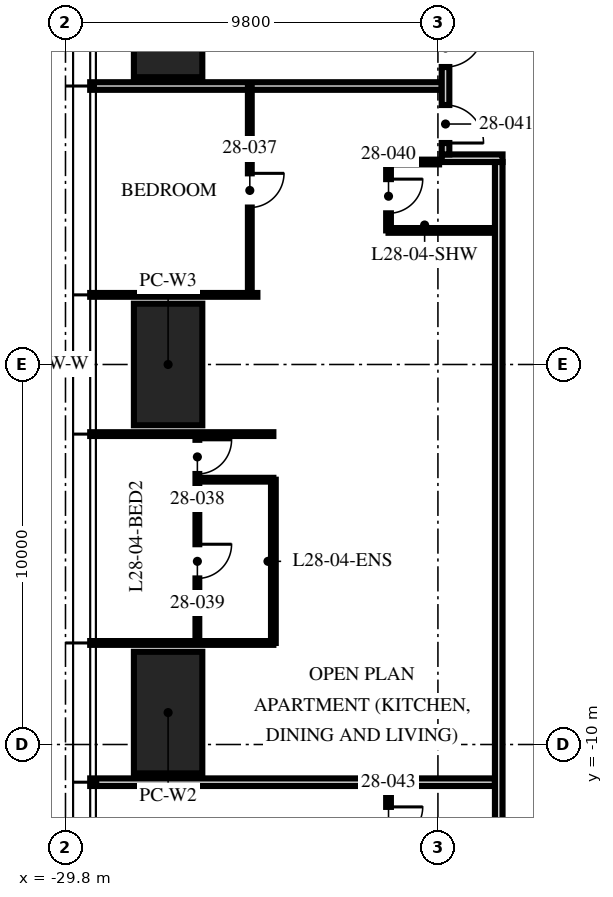
"""IFC4 building model, lengths in metres.
Left out: names, types, materials, properties, quantities, classifications, styles, units other than length and angle.
Written with IfcOpenShell. Run it as: python <this file> out.ifc"""

import sys

from ifc_helpers import new_model, si_unit, direction, frame, frame_2d, origin, origin_2d, place, context, subcontext, project, spatial, rectangle, hollow_rectangle, extrude, element, fill, save


model = new_model("IFC4")
c1 = context("Model", 3, precision=1e-05, world=origin(), true_north=direction((0.0, 1.0)))
c2 = subcontext(c1, "Body", "Model", "MODEL_VIEW")
j1 = project(units=[si_unit("LENGTHUNIT", "METRE"), si_unit("PLANEANGLEUNIT", "RADIAN")], contexts=[c1])
p1 = place(None, origin())
s1 = spatial("IfcSite", under=j1, at=p1, CompositionType="ELEMENT")
p2 = place(p1, origin())
s2 = spatial("IfcBuilding", under=s1, at=p2, CompositionType="ELEMENT")
p3 = place(p2, frame((0.0, 0.0, 114.75)))
s3 = spatial("IfcBuildingStorey", under=s2, at=p3, CompositionType="ELEMENT", Elevation=114.75)
for number, where, z_axis, x_axis in (
    (1, (-27.1, -9.16, 0.0), (0.0, 0.0, 1.0), (0.0, 1.0, 0.0)),
    (2, (-27.1, 0.0, 0.0), (0.0, 0.0, 1.0), (0.0, 1.0, 0.0)),
    (3, (-27.1, 9.16, 0.0), (0.0, 0.0, 1.0), (0.0, 1.0, 0.0)),
):
    element("IfcColumn", number, at=place(p3, frame(where, z_axis=z_axis, x_axis=x_axis)), inside=s3, PredefinedType="COLUMN", context=c2, shape_type="SweptSolid", body=[
        extrude(hollow_rectangle(XDim=3.2, YDim=1.8, WallThickness=0.2, at=origin_2d()), origin(), (0.0, 0.0, 1.0), 3.75),
    ])
p4 = place(p3, frame((-19.9, 7.328, 0.0), z_axis=(0.0, 0.0, 1.0), x_axis=(-1.0, 0.0, 0.0)))
e4 = element("IfcWall", 4, at=p4, inside=s3, PredefinedType="PARTITIONING", context=c2, shape_type="SweptSolid", body=[
    extrude(rectangle(XDim=9.25, YDim=0.2, at=frame_2d((4.625, 0.0))), origin(), (0.0, 0.0, 1.0), 2.81),
])
p5 = place(p3, frame((-24.75, 1.832, 0.0), z_axis=(0.0, 0.0, 1.0), x_axis=(-1.0, 0.0, 0.0)))
e5 = element("IfcWall", 5, at=p5, inside=s3, PredefinedType="PARTITIONING", context=c2, shape_type="SweptSolid", body=[
    extrude(rectangle(XDim=4.4, YDim=0.1, at=frame_2d((2.2, 0.0))), origin(), (0.0, 0.0, 1.0), 2.81),
])
for number, where, z_axis, x_axis in (
    (6, (-24.33, -1.832, 0.0), (0.0, 0.0, 1.0), (-1.0, 0.0, 0.0)),
    (7, (-24.33, -7.328, 0.0), (0.0, 0.0, 1.0), (-1.0, 0.0, 0.0)),
):
    element("IfcWall", number, at=place(p3, frame(where, z_axis=z_axis, x_axis=x_axis)), inside=s3, PredefinedType="PARTITIONING", context=c2, shape_type="SweptSolid", body=[
        extrude(rectangle(XDim=4.82, YDim=0.1, at=frame_2d((2.41, 0.0))), origin(), (0.0, 0.0, 1.0), 2.81),
    ])
p6 = place(p3, frame((-18.5, -10.992, 0.0), z_axis=(0.0, 0.0, 1.0), x_axis=(-1.0, 0.0, 0.0)))
e8 = element("IfcWall", 8, at=p6, inside=s3, PredefinedType="PARTITIONING", context=c2, shape_type="SweptSolid", body=[
    extrude(rectangle(XDim=10.65, YDim=0.2, at=frame_2d((5.325, 0.0))), origin(), (0.0, 0.0, 1.0), 2.81),
])
p7 = place(p3, frame((-24.95, 7.328, 0.0), z_axis=(0.0, 0.0, 1.0), x_axis=(0.0, -1.0, 0.0)))
e9 = element("IfcWall", 9, at=p7, inside=s3, PredefinedType="PARTITIONING", context=c2, shape_type="SweptSolid", body=[
    extrude(rectangle(XDim=5.496, YDim=0.1, at=frame_2d((2.748, 0.0))), origin(), (0.0, 0.0, 1.0), 2.81),
])
p8 = place(p7, frame((2.298, 0.0, 0.0)))
e10 = element("IfcOpeningElement", 10, at=p8, cuts=e9, PredefinedType="OPENING", context=c2, shape_type="SweptSolid", body=[
    extrude(rectangle(XDim=0.9, YDim=2.1, at=frame_2d((0.45, 1.05))), frame((0.0, 0.06, 0.0), z_axis=(0.0, -1.0, 0.0), x_axis=(1.0, 0.0, 0.0)), (0.0, 0.0, 1.0), 0.12),
])
p9 = place(p3, frame((-26.33, -1.832, 0.0), z_axis=(0.0, 0.0, 1.0), x_axis=(0.0, -1.0, 0.0)))
e11 = element("IfcWall", 11, at=p9, inside=s3, PredefinedType="PARTITIONING", context=c2, shape_type="SweptSolid", body=[
    extrude(rectangle(XDim=5.496, YDim=0.1, at=frame_2d((2.748, 0.0))), origin(), (0.0, 0.0, 1.0), 2.81),
])
p10 = place(p9, frame((0.15, 0.0, 0.0)))
e12 = element("IfcOpeningElement", 12, at=p10, cuts=e11, PredefinedType="OPENING", context=c2, shape_type="SweptSolid", body=[
    extrude(rectangle(XDim=0.9, YDim=2.1, at=frame_2d((0.45, 1.05))), frame((0.0, 0.06, 0.0), z_axis=(0.0, -1.0, 0.0), x_axis=(1.0, 0.0, 0.0)), (0.0, 0.0, 1.0), 0.12),
])
p11 = place(p9, frame((2.898, 0.0, 0.0)))
e13 = element("IfcOpeningElement", 13, at=p11, cuts=e11, PredefinedType="OPENING", context=c2, shape_type="SweptSolid", body=[
    extrude(rectangle(XDim=0.9, YDim=2.1, at=frame_2d((0.45, 1.05))), frame((0.0, 0.06, 0.0), z_axis=(0.0, -1.0, 0.0), x_axis=(1.0, 0.0, 0.0)), (0.0, 0.0, 1.0), 0.12),
])
p12 = place(p3, frame((-24.33, -3.032, 0.0), z_axis=(0.0, 0.0, 1.0), x_axis=(-1.0, 0.0, 0.0)))
e14 = element("IfcWall", 14, at=p12, inside=s3, PredefinedType="PARTITIONING", context=c2, shape_type="SweptSolid", body=[
    extrude(rectangle(XDim=2.0, YDim=0.1, at=frame_2d((1.0, 0.0))), origin(), (0.0, 0.0, 1.0), 3.5),
])
p13 = place(p3, frame((-24.33, -3.032, 0.0), z_axis=(0.0, 0.0, 1.0), x_axis=(0.0, -1.0, 0.0)))
e15 = element("IfcWall", 15, at=p13, inside=s3, PredefinedType="PARTITIONING", context=c2, shape_type="SweptSolid", body=[
    extrude(rectangle(XDim=4.296, YDim=0.125, at=frame_2d((2.148, 0.0))), origin(), (0.0, 0.0, 1.0), 2.81),
])
p14 = place(p3, frame((-21.3, 5.328, 0.0), z_axis=(0.0, 0.0, 1.0), x_axis=(0.0, -1.0, 0.0)))
e16 = element("IfcWall", 16, at=p14, inside=s3, PredefinedType="PARTITIONING", context=c2, shape_type="SweptSolid", body=[
    extrude(rectangle(XDim=1.8, YDim=0.125, at=frame_2d((0.9, 0.0))), origin(), (0.0, 0.0, 1.0), 2.81),
])
p15 = place(p14, frame((0.45, 0.0, 0.0)))
e17 = element("IfcOpeningElement", 17, at=p15, cuts=e16, PredefinedType="OPENING", context=c2, shape_type="SweptSolid", body=[
    extrude(rectangle(XDim=0.9, YDim=2.1, at=frame_2d((0.45, 1.05))), frame((0.0, 0.073, 0.0), z_axis=(0.0, -1.0, 0.0), x_axis=(1.0, 0.0, 0.0)), (0.0, 0.0, 1.0), 0.145),
])
p16 = place(p3, frame((-19.97, 5.328, 0.0), z_axis=(0.0, 0.0, 1.0), x_axis=(-1.0, 0.0, 0.0)))
e18 = element("IfcWall", 18, at=p16, inside=s3, PredefinedType="PARTITIONING", context=c2, shape_type="SweptSolid", body=[
    extrude(rectangle(XDim=1.33, YDim=0.125, at=frame_2d((0.665, 0.0))), origin(), (0.0, 0.0, 1.0), 3.5),
])
p17 = place(p3, frame((-18.5, 3.528, 0.0), z_axis=(0.0, 0.0, 1.0), x_axis=(-1.0, 0.0, 0.0)))
e19 = element("IfcWall", 19, at=p17, inside=s3, PredefinedType="PARTITIONING", context=c2, shape_type="SweptSolid", body=[
    extrude(rectangle(XDim=2.8, YDim=0.125, at=frame_2d((1.4, 0.0))), origin(), (0.0, 0.0, 1.0), 3.5),
])
p18 = place(p3, frame((-21.3, -10.992, 0.0), z_axis=(0.0, 0.0, 1.0), x_axis=(0.0, -1.0, 0.0)))
e20 = element("IfcWall", 20, at=p18, inside=s3, PredefinedType="PARTITIONING", context=c2, shape_type="SweptSolid", body=[
    extrude(rectangle(XDim=2.2, YDim=0.125, at=frame_2d((1.1, 0.0))), origin(), (0.0, 0.0, 1.0), 3.5),
])
p19 = place(p18, frame((0.65, 0.0, 0.0)))
e21 = element("IfcOpeningElement", 21, at=p19, cuts=e20, PredefinedType="OPENING", context=c2, shape_type="SweptSolid", body=[
    extrude(rectangle(XDim=0.9, YDim=2.1, at=frame_2d((0.45, 1.05))), frame((0.0, 0.073, 0.0), z_axis=(0.0, -1.0, 0.0), x_axis=(1.0, 0.0, 0.0)), (0.0, 0.0, 1.0), 0.145),
])
p20 = place(p3, frame((-18.3, 5.428, 0.0), z_axis=(0.0, 0.0, 1.0), x_axis=(-1.0, 0.0, 0.0)))
e22 = element("IfcWall", 22, at=p20, inside=s3, PredefinedType="PARTITIONING", context=c2, shape_type="SweptSolid", body=[
    extrude(rectangle(XDim=1.6, YDim=0.2, at=frame_2d((0.8, 0.0))), origin(), (0.0, 0.0, 1.0), 3.5),
])
p21 = place(p3, frame((-19.8, 9.128, 0.0), z_axis=(0.0, 0.0, 1.0), x_axis=(0.0, -1.0, 0.0)))
e23 = element("IfcWall", 23, at=p21, inside=s3, PredefinedType="PARTITIONING", context=c2, shape_type="SweptSolid", body=[
    extrude(rectangle(XDim=3.6, YDim=0.2, at=frame_2d((1.8, 0.0))), origin(), (0.0, 0.0, 1.0), 2.7),
])
p22 = place(p21, frame((0.3, 0.0, 0.0)))
e24 = element("IfcOpeningElement", 24, at=p22, cuts=e23, PredefinedType="OPENING", context=c2, shape_type="SweptSolid", body=[
    extrude(rectangle(XDim=1.0, YDim=2.2, at=frame_2d((0.5, 1.1))), frame((0.0, 0.11, 0.0), z_axis=(0.0, -1.0, 0.0), x_axis=(1.0, 0.0, 0.0)), (0.0, 0.0, 1.0), 0.22),
])
p23 = place(p21, frame((2.3, 0.0, 0.0)))
e25 = element("IfcOpeningElement", 25, at=p23, cuts=e23, PredefinedType="OPENING", context=c2, shape_type="SweptSolid", body=[
    extrude(rectangle(XDim=1.0, YDim=2.2, at=frame_2d((0.5, 1.1))), frame((0.0, 0.11, 0.0), z_axis=(0.0, -1.0, 0.0), x_axis=(1.0, 0.0, 0.0)), (0.0, 0.0, 1.0), 0.22),
])
p24 = place(p3, frame((-18.4, 5.328, 0.0), z_axis=(0.0, 0.0, 1.0), x_axis=(0.0, -1.0, 0.0)))
e26 = element("IfcWall", 26, at=p24, inside=s3, PredefinedType="PARTITIONING", context=c2, shape_type="SweptSolid", body=[
    extrude(rectangle(XDim=23.628, YDim=0.2, at=frame_2d((11.814, 0.0))), origin(), (0.0, 0.0, 1.0), 2.3),
])
p25 = place(p24, frame((21.84, 0.0, 0.0)))
e27 = element("IfcOpeningElement", 27, at=p25, cuts=e26, PredefinedType="OPENING", context=c2, shape_type="SweptSolid", body=[
    extrude(rectangle(XDim=1.0, YDim=2.2, at=frame_2d((0.5, 1.1))), frame((0.0, 0.11, 0.0), z_axis=(0.0, -1.0, 0.0), x_axis=(1.0, 0.0, 0.0)), (0.0, 0.0, 1.0), 0.22),
])
p26 = place(p22, origin())
e28 = element("IfcDoor", 28, at=p26, inside=s3, OperationType="SINGLE_SWING_LEFT", PredefinedType="DOOR", context=c2, shape_type="SweptSolid", body=[
    extrude(rectangle(XDim=1.0, YDim=2.2, at=frame_2d((0.5, 1.1))), frame((0.0, 0.025, 0.0), z_axis=(0.0, -1.0, 0.0), x_axis=(1.0, 0.0, 0.0)), (0.0, 0.0, 1.0), 0.05),
])
fill(e24, e28)
p27 = place(p8, origin())
e29 = element("IfcDoor", 29, at=p27, inside=s3, OperationType="SINGLE_SWING_LEFT", PredefinedType="DOOR", context=c2, shape_type="SweptSolid", body=[
    extrude(rectangle(XDim=0.9, YDim=2.1, at=frame_2d((0.45, 1.05))), frame((0.0, 0.025, 0.0), z_axis=(0.0, -1.0, 0.0), x_axis=(1.0, 0.0, 0.0)), (0.0, 0.0, 1.0), 0.05),
])
fill(e10, e29)
p28 = place(p10, origin())
e30 = element("IfcDoor", 30, at=p28, inside=s3, OperationType="SINGLE_SWING_LEFT", PredefinedType="DOOR", context=c2, shape_type="SweptSolid", body=[
    extrude(rectangle(XDim=0.9, YDim=2.1, at=frame_2d((0.45, 1.05))), frame((0.0, 0.025, 0.0), z_axis=(0.0, -1.0, 0.0), x_axis=(1.0, 0.0, 0.0)), (0.0, 0.0, 1.0), 0.05),
])
fill(e12, e30)
p29 = place(p11, origin())
e31 = element("IfcDoor", 31, at=p29, inside=s3, OperationType="SINGLE_SWING_LEFT", PredefinedType="DOOR", context=c2, shape_type="SweptSolid", body=[
    extrude(rectangle(XDim=0.9, YDim=2.1, at=frame_2d((0.45, 1.05))), frame((0.0, 0.025, 0.0), z_axis=(0.0, -1.0, 0.0), x_axis=(1.0, 0.0, 0.0)), (0.0, 0.0, 1.0), 0.05),
])
fill(e13, e31)
p30 = place(p15, origin())
e32 = element("IfcDoor", 32, at=p30, inside=s3, OperationType="SINGLE_SWING_LEFT", PredefinedType="DOOR", context=c2, shape_type="SweptSolid", body=[
    extrude(rectangle(XDim=0.9, YDim=2.1, at=frame_2d((0.45, 1.05))), frame((0.0, 0.025, 0.0), z_axis=(0.0, -1.0, 0.0), x_axis=(1.0, 0.0, 0.0)), (0.0, 0.0, 1.0), 0.05),
])
fill(e17, e32)
p31 = place(p23, origin())
e33 = element("IfcDoor", 33, at=p31, inside=s3, OperationType="SINGLE_SWING_RIGHT", PredefinedType="DOOR", context=c2, shape_type="SweptSolid", body=[
    extrude(rectangle(XDim=1.0, YDim=2.2, at=frame_2d((0.5, 1.1))), frame((0.0, 0.025, 0.0), z_axis=(0.0, -1.0, 0.0), x_axis=(1.0, 0.0, 0.0)), (0.0, 0.0, 1.0), 0.05),
])
fill(e25, e33)
p32 = place(p19, origin())
e34 = element("IfcDoor", 34, at=p32, inside=s3, OperationType="SINGLE_SWING_LEFT", PredefinedType="DOOR", context=c2, shape_type="SweptSolid", body=[
    extrude(rectangle(XDim=0.9, YDim=2.1, at=frame_2d((0.45, 1.05))), frame((0.0, 0.025, 0.0), z_axis=(0.0, -1.0, 0.0), x_axis=(1.0, 0.0, 0.0)), (0.0, 0.0, 1.0), 0.05),
])
fill(e21, e34)
save(model, sys.argv[1])
